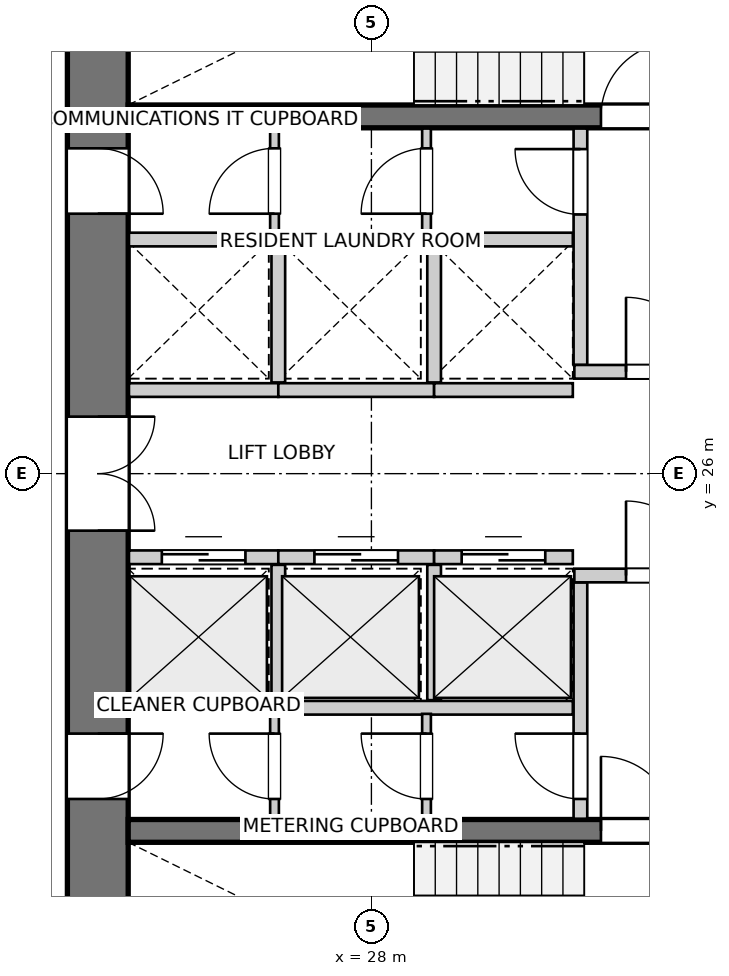
"""IFC4 building model, lengths in metres.
Left out: names, types, materials, properties, quantities, classifications, styles, units other than length and angle.
Written with IfcOpenShell. Run it as: python <this file> out.ifc"""

import sys

from ifc_helpers import new_model, si_unit, direction, frame, frame_2d, origin, place, context, subcontext, project, spatial, rectangle, extrude, source, transform, mapped, element, fill, save


model = new_model("IFC4")
c1 = context("Model", 3, precision=1e-05, world=origin(), true_north=direction((0.0, 1.0)))
c2 = subcontext(c1, "Body", "Model", "MODEL_VIEW")
j1 = project(units=[si_unit("LENGTHUNIT", "METRE"), si_unit("PLANEANGLEUNIT", "RADIAN")], contexts=[c1])
p1 = place(None, origin())
s1 = spatial("IfcSite", under=j1, at=p1, CompositionType="ELEMENT")
p2 = place(p1, origin())
s2 = spatial("IfcBuilding", under=s1, at=p2, CompositionType="ELEMENT")
p3 = place(p2, frame((0.0, 0.0, 30.2)))
s3 = spatial("IfcBuildingStorey", under=s2, at=p3, CompositionType="ELEMENT", Elevation=30.2)
p4 = place(p3, frame((24.4, 33.8, 0.0), z_axis=(0.0, 0.0, 1.0), x_axis=(0.0, -1.0, 0.0)))
e1 = element("IfcWall", 1, at=p4, inside=s3, PredefinedType="SHEAR", context=c2, shape_type="SweptSolid", body=[
    extrude(rectangle(XDim=15.6, YDim=0.8, at=frame_2d((7.8, 0.0))), origin(), (0.0, 0.0, 1.0), 2.935),
])
p5 = place(p4, frame((7.05, 0.0, 0.0)))
e2 = element("IfcOpeningElement", 2, at=p5, cuts=e1, PredefinedType="OPENING", context=c2, shape_type="SweptSolid", body=[
    extrude(rectangle(XDim=1.5, YDim=2.15, at=frame_2d((0.75, 1.075))), frame((0.0, 0.41, 0.0), z_axis=(0.0, -1.0, 0.0), x_axis=(1.0, 0.0, 0.0)), (0.0, 0.0, 1.0), 0.82),
])
p6 = place(p4, frame((3.52, 0.0, 0.0)))
e3 = element("IfcOpeningElement", 3, at=p6, cuts=e1, PredefinedType="OPENING", context=c2, shape_type="SweptSolid", body=[
    extrude(rectangle(XDim=0.86, YDim=2.05, at=frame_2d((0.43, 1.025))), frame((0.0, 0.41, 0.0), z_axis=(0.0, -1.0, 0.0), x_axis=(1.0, 0.0, 0.0)), (0.0, 0.0, 1.0), 0.82),
])
p7 = place(p4, frame((11.22, 0.0, 0.0)))
e4 = element("IfcOpeningElement", 4, at=p7, cuts=e1, PredefinedType="OPENING", context=c2, shape_type="SweptSolid", body=[
    extrude(rectangle(XDim=0.86, YDim=2.05, at=frame_2d((0.43, 1.025))), frame((0.0, 0.41, 0.0), z_axis=(0.0, -1.0, 0.0), x_axis=(1.0, 0.0, 0.0)), (0.0, 0.0, 1.0), 0.82),
])
p8 = place(p3, frame((24.8, 21.3, 0.0), z_axis=(0.0, 0.0, 1.0), x_axis=(1.0, 0.0, 0.0)))
e5 = element("IfcWall", 5, at=p8, inside=s3, PredefinedType="SHEAR", context=c2, shape_type="SweptSolid", body=[
    extrude(rectangle(XDim=11.1, YDim=0.3, at=frame_2d((5.55, 0.0))), origin(), (0.0, 0.0, 1.0), 2.935),
])
p9 = place(p8, frame((6.22, 0.0, 0.0)))
e6 = element("IfcOpeningElement", 6, at=p9, cuts=e5, PredefinedType="OPENING", context=c2, shape_type="SweptSolid", body=[
    extrude(rectangle(XDim=0.98, YDim=2.15, at=frame_2d((0.49, 1.075))), frame((0.0, 0.16, 0.0), z_axis=(0.0, -1.0, 0.0), x_axis=(1.0, 0.0, 0.0)), (0.0, 0.0, 1.0), 0.32),
])
p10 = place(p8, frame((9.15, 0.0, 0.0)))
e7 = element("IfcOpeningElement", 7, at=p10, cuts=e5, PredefinedType="OPENING", context=c2, shape_type="SweptSolid", body=[
    extrude(rectangle(XDim=1.15, YDim=2.15, at=frame_2d((0.575, 1.075))), frame((0.0, 0.16, 0.0), z_axis=(0.0, -1.0, 0.0), x_axis=(1.0, 0.0, 0.0)), (0.0, 0.0, 1.0), 0.32),
])
p11 = place(p3, frame((24.8, 30.7, 0.0), z_axis=(0.0, 0.0, 1.0), x_axis=(1.0, 0.0, 0.0)))
e8 = element("IfcWall", 8, at=p11, inside=s3, PredefinedType="SHEAR", context=c2, shape_type="SweptSolid", body=[
    extrude(rectangle(XDim=11.1, YDim=0.3, at=frame_2d((5.55, 0.0))), origin(), (0.0, 0.0, 1.0), 2.935),
])
p12 = place(p11, frame((6.22, 0.0, 0.0)))
e9 = element("IfcOpeningElement", 9, at=p12, cuts=e8, PredefinedType="OPENING", context=c2, shape_type="SweptSolid", body=[
    extrude(rectangle(XDim=0.98, YDim=2.15, at=frame_2d((0.49, 1.075))), frame((0.0, 0.16, 0.0), z_axis=(0.0, -1.0, 0.0), x_axis=(1.0, 0.0, 0.0)), (0.0, 0.0, 1.0), 0.32),
])
p13 = place(p11, frame((9.15, 0.0, 0.0)))
e10 = element("IfcOpeningElement", 10, at=p13, cuts=e8, PredefinedType="OPENING", context=c2, shape_type="SweptSolid", body=[
    extrude(rectangle(XDim=1.15, YDim=2.15, at=frame_2d((0.575, 1.075))), frame((0.0, 0.16, 0.0), z_axis=(0.0, -1.0, 0.0), x_axis=(1.0, 0.0, 0.0)), (0.0, 0.0, 1.0), 0.32),
])
p14 = place(p3, frame((30.75, 21.46, 0.0), z_axis=(0.0, 0.0, 1.0), x_axis=(0.0, 1.0, 0.0)))
e11 = element("IfcWall", 11, at=p14, inside=s3, PredefinedType="PARTITIONING", context=c2, shape_type="SweptSolid", body=[
    extrude(rectangle(XDim=3.11, YDim=0.18, at=frame_2d((1.555, 0.0))), origin(), (0.0, 0.0, 1.0), 2.935),
])
p15 = place(p14, frame((0.26, 0.0, 0.0)))
e12 = element("IfcOpeningElement", 12, at=p15, cuts=e11, PredefinedType="OPENING", context=c2, shape_type="SweptSolid", body=[
    extrude(rectangle(XDim=0.86, YDim=2.05, at=frame_2d((0.43, 1.025))), frame((0.0, 0.1, 0.0), z_axis=(0.0, -1.0, 0.0), x_axis=(1.0, 0.0, 0.0)), (0.0, 0.0, 1.0), 0.2),
])
p16 = place(p3, frame((30.67, 24.66, 0.0), z_axis=(0.0, 0.0, 1.0), x_axis=(1.0, 0.0, 0.0)))
e13 = element("IfcWall", 13, at=p16, inside=s3, PredefinedType="PARTITIONING", context=c2, shape_type="SweptSolid", body=[
    extrude(rectangle(XDim=5.22, YDim=0.18, at=frame_2d((2.61, 0.0))), origin(), (0.0, 0.0, 1.0), 2.935),
])
p17 = place(p16, frame((0.68, 0.0, 0.0)))
e14 = element("IfcOpeningElement", 14, at=p17, cuts=e13, PredefinedType="OPENING", context=c2, shape_type="SweptSolid", body=[
    extrude(rectangle(XDim=0.98, YDim=2.15, at=frame_2d((0.49, 1.075))), frame((0.0, 0.1, 0.0), z_axis=(0.0, -1.0, 0.0), x_axis=(1.0, 0.0, 0.0)), (0.0, 0.0, 1.0), 0.2),
])
p18 = place(p3, frame((30.75, 27.43, 0.0), z_axis=(0.0, 0.0, 1.0), x_axis=(0.0, 1.0, 0.0)))
e15 = element("IfcWall", 15, at=p18, inside=s3, PredefinedType="PARTITIONING", context=c2, shape_type="SweptSolid", body=[
    extrude(rectangle(XDim=3.11, YDim=0.18, at=frame_2d((1.555, 0.0))), origin(), (0.0, 0.0, 1.0), 2.935),
])
p19 = place(p18, frame((1.98, 0.0, 0.0)))
e16 = element("IfcOpeningElement", 16, at=p19, cuts=e15, PredefinedType="OPENING", context=c2, shape_type="SweptSolid", body=[
    extrude(rectangle(XDim=0.86, YDim=2.05, at=frame_2d((0.43, 1.025))), frame((0.0, 0.1, 0.0), z_axis=(0.0, -1.0, 0.0), x_axis=(1.0, 0.0, 0.0)), (0.0, 0.0, 1.0), 0.2),
])
p20 = place(p3, frame((30.67, 27.34, 0.0), z_axis=(0.0, 0.0, 1.0), x_axis=(1.0, 0.0, 0.0)))
e17 = element("IfcWall", 17, at=p20, inside=s3, PredefinedType="PARTITIONING", context=c2, shape_type="SweptSolid", body=[
    extrude(rectangle(XDim=5.22, YDim=0.18, at=frame_2d((2.61, 0.0))), origin(), (0.0, 0.0, 1.0), 2.935),
])
p21 = place(p20, frame((0.68, 0.0, 0.0)))
e18 = element("IfcOpeningElement", 18, at=p21, cuts=e17, PredefinedType="OPENING", context=c2, shape_type="SweptSolid", body=[
    extrude(rectangle(XDim=0.98, YDim=2.15, at=frame_2d((0.49, 1.075))), frame((0.0, 0.1, 0.0), z_axis=(0.0, -1.0, 0.0), x_axis=(1.0, 0.0, 0.0)), (0.0, 0.0, 1.0), 0.2),
])
p22 = place(p3, frame((24.81, 22.92, 0.0), z_axis=(0.0, 0.0, 1.0), x_axis=(1.0, 0.0, 0.0)))
e19 = element("IfcWall", 19, at=p22, inside=s3, PredefinedType="PARTITIONING", context=c2, shape_type="SweptSolid", body=[
    extrude(rectangle(XDim=5.84, YDim=0.18, at=frame_2d((2.92, 0.0))), origin(), (0.0, 0.0, 1.0), 2.935),
])
p23 = place(p3, frame((24.81, 24.9, 0.0), z_axis=(0.0, 0.0, 1.0), x_axis=(1.0, 0.0, 0.0)))
e20 = element("IfcWall", 20, at=p23, inside=s3, PredefinedType="PARTITIONING", context=c2, shape_type="SweptSolid", body=[
    extrude(rectangle(XDim=1.965, YDim=0.18, at=frame_2d((0.982, 0.0))), origin(), (0.0, 0.0, 1.0), 2.935),
])
p24 = place(p23, frame((0.433, 0.0, 0.0)))
e21 = element("IfcOpeningElement", 21, at=p24, cuts=e20, PredefinedType="OPENING", context=c2, shape_type="SweptSolid", body=[
    extrude(rectangle(XDim=1.1, YDim=2.15, at=frame_2d((0.55, 1.075))), frame((0.0, 0.1, 0.0), z_axis=(0.0, -1.0, 0.0), x_axis=(1.0, 0.0, 0.0)), (0.0, 0.0, 1.0), 0.2),
])
p25 = place(p3, frame((26.775, 24.9, 0.0), z_axis=(0.0, 0.0, 1.0), x_axis=(1.0, 0.0, 0.0)))
e22 = element("IfcWall", 22, at=p25, inside=s3, PredefinedType="PARTITIONING", context=c2, shape_type="SweptSolid", body=[
    extrude(rectangle(XDim=2.05, YDim=0.18, at=frame_2d((1.025, 0.0))), origin(), (0.0, 0.0, 1.0), 2.935),
])
p26 = place(p25, frame((0.475, 0.0, 0.0)))
e23 = element("IfcOpeningElement", 23, at=p26, cuts=e22, PredefinedType="OPENING", context=c2, shape_type="SweptSolid", body=[
    extrude(rectangle(XDim=1.1, YDim=2.15, at=frame_2d((0.55, 1.075))), frame((0.0, 0.1, 0.0), z_axis=(0.0, -1.0, 0.0), x_axis=(1.0, 0.0, 0.0)), (0.0, 0.0, 1.0), 0.2),
])
p27 = place(p3, frame((26.775, 23.02, 0.0), z_axis=(0.0, 0.0, 1.0), x_axis=(0.0, 1.0, 0.0)))
e24 = element("IfcWall", 24, at=p27, inside=s3, PredefinedType="PARTITIONING", context=c2, shape_type="SweptSolid", body=[
    extrude(rectangle(XDim=1.78, YDim=0.18, at=frame_2d((0.89, 0.0))), origin(), (0.0, 0.0, 1.0), 2.935),
])
p28 = place(p3, frame((28.825, 24.9, 0.0), z_axis=(0.0, 0.0, 1.0), x_axis=(1.0, 0.0, 0.0)))
e25 = element("IfcWall", 25, at=p28, inside=s3, PredefinedType="PARTITIONING", context=c2, shape_type="SweptSolid", body=[
    extrude(rectangle(XDim=1.825, YDim=0.18, at=frame_2d((0.913, 0.0))), origin(), (0.0, 0.0, 1.0), 2.935),
])
p29 = place(p28, frame((0.363, 0.0, 0.0)))
e26 = element("IfcOpeningElement", 26, at=p29, cuts=e25, PredefinedType="OPENING", context=c2, shape_type="SweptSolid", body=[
    extrude(rectangle(XDim=1.1, YDim=2.15, at=frame_2d((0.55, 1.075))), frame((0.0, 0.1, 0.0), z_axis=(0.0, -1.0, 0.0), x_axis=(1.0, 0.0, 0.0)), (0.0, 0.0, 1.0), 0.2),
])
p30 = place(p3, frame((28.825, 23.02, 0.0), z_axis=(0.0, 0.0, 1.0), x_axis=(0.0, 1.0, 0.0)))
e27 = element("IfcWall", 27, at=p30, inside=s3, PredefinedType="PARTITIONING", context=c2, shape_type="SweptSolid", body=[
    extrude(rectangle(XDim=1.78, YDim=0.18, at=frame_2d((0.89, 0.0))), origin(), (0.0, 0.0, 1.0), 2.935),
])
p31 = place(p3, frame((24.81, 29.08, 0.0), z_axis=(0.0, 0.0, 1.0), x_axis=(1.0, 0.0, 0.0)))
e28 = element("IfcWall", 28, at=p31, inside=s3, PredefinedType="PARTITIONING", context=c2, shape_type="SweptSolid", body=[
    extrude(rectangle(XDim=5.84, YDim=0.18, at=frame_2d((2.92, 0.0))), origin(), (0.0, 0.0, 1.0), 2.935),
])
p32 = place(p3, frame((24.81, 27.1, 0.0), z_axis=(0.0, 0.0, 1.0), x_axis=(1.0, 0.0, 0.0)))
e29 = element("IfcWall", 29, at=p32, inside=s3, PredefinedType="PARTITIONING", context=c2, shape_type="SweptSolid", body=[
    extrude(rectangle(XDim=1.965, YDim=0.18, at=frame_2d((0.982, 0.0))), origin(), (0.0, 0.0, 1.0), 2.935),
])
p33 = place(p3, frame((26.775, 27.1, 0.0), z_axis=(0.0, 0.0, 1.0), x_axis=(1.0, 0.0, 0.0)))
e30 = element("IfcWall", 30, at=p33, inside=s3, PredefinedType="PARTITIONING", context=c2, shape_type="SweptSolid", body=[
    extrude(rectangle(XDim=2.05, YDim=0.18, at=frame_2d((1.025, 0.0))), origin(), (0.0, 0.0, 1.0), 2.935),
])
p34 = place(p3, frame((26.775, 27.2, 0.0), z_axis=(0.0, 0.0, 1.0), x_axis=(0.0, 1.0, 0.0)))
e31 = element("IfcWall", 31, at=p34, inside=s3, PredefinedType="PARTITIONING", context=c2, shape_type="SweptSolid", body=[
    extrude(rectangle(XDim=1.78, YDim=0.18, at=frame_2d((0.89, 0.0))), origin(), (0.0, 0.0, 1.0), 2.935),
])
p35 = place(p3, frame((28.825, 27.1, 0.0), z_axis=(0.0, 0.0, 1.0), x_axis=(1.0, 0.0, 0.0)))
e32 = element("IfcWall", 32, at=p35, inside=s3, PredefinedType="PARTITIONING", context=c2, shape_type="SweptSolid", body=[
    extrude(rectangle(XDim=1.825, YDim=0.18, at=frame_2d((0.913, 0.0))), origin(), (0.0, 0.0, 1.0), 2.935),
])
p36 = place(p3, frame((28.825, 27.2, 0.0), z_axis=(0.0, 0.0, 1.0), x_axis=(0.0, 1.0, 0.0)))
e33 = element("IfcWall", 33, at=p36, inside=s3, PredefinedType="PARTITIONING", context=c2, shape_type="SweptSolid", body=[
    extrude(rectangle(XDim=1.78, YDim=0.18, at=frame_2d((0.89, 0.0))), origin(), (0.0, 0.0, 1.0), 2.935),
])
p37 = place(p3, frame((26.725, 21.46, 0.0), z_axis=(0.0, 0.0, 1.0), x_axis=(0.0, 1.0, 0.0)))
e34 = element("IfcWall", 34, at=p37, inside=s3, PredefinedType="PARTITIONING", context=c2, shape_type="SweptSolid", body=[
    extrude(rectangle(XDim=1.38, YDim=0.115, at=frame_2d((0.69, 0.0))), origin(), (0.0, 0.0, 1.0), 2.935),
])
p38 = place(p37, frame((0.26, 0.0, 0.0)))
e35 = element("IfcOpeningElement", 35, at=p38, cuts=e34, PredefinedType="OPENING", context=c2, shape_type="SweptSolid", body=[
    extrude(rectangle(XDim=0.86, YDim=2.05, at=frame_2d((0.43, 1.025))), frame((0.0, 0.067, 0.0), z_axis=(0.0, -1.0, 0.0), x_axis=(1.0, 0.0, 0.0)), (0.0, 0.0, 1.0), 0.135),
])
p39 = place(p3, frame((26.725, 29.16, 0.0), z_axis=(0.0, 0.0, 1.0), x_axis=(0.0, 1.0, 0.0)))
e36 = element("IfcWall", 36, at=p39, inside=s3, PredefinedType="PARTITIONING", context=c2, shape_type="SweptSolid", body=[
    extrude(rectangle(XDim=1.38, YDim=0.115, at=frame_2d((0.69, 0.0))), origin(), (0.0, 0.0, 1.0), 2.935),
])
p40 = place(p39, frame((0.26, 0.0, 0.0)))
e37 = element("IfcOpeningElement", 37, at=p40, cuts=e36, PredefinedType="OPENING", context=c2, shape_type="SweptSolid", body=[
    extrude(rectangle(XDim=0.86, YDim=2.05, at=frame_2d((0.43, 1.025))), frame((0.0, 0.067, 0.0), z_axis=(0.0, -1.0, 0.0), x_axis=(1.0, 0.0, 0.0)), (0.0, 0.0, 1.0), 0.135),
])
p41 = place(p3, frame((28.725, 21.46, 0.0), z_axis=(0.0, 0.0, 1.0), x_axis=(0.0, 1.0, 0.0)))
e38 = element("IfcWall", 38, at=p41, inside=s3, PredefinedType="PARTITIONING", context=c2, shape_type="SweptSolid", body=[
    extrude(rectangle(XDim=1.38, YDim=0.115, at=frame_2d((0.69, 0.0))), origin(), (0.0, 0.0, 1.0), 2.935),
])
p42 = place(p41, frame((0.26, 0.0, 0.0)))
e39 = element("IfcOpeningElement", 39, at=p42, cuts=e38, PredefinedType="OPENING", context=c2, shape_type="SweptSolid", body=[
    extrude(rectangle(XDim=0.86, YDim=2.05, at=frame_2d((0.43, 1.025))), frame((0.0, 0.067, 0.0), z_axis=(0.0, -1.0, 0.0), x_axis=(1.0, 0.0, 0.0)), (0.0, 0.0, 1.0), 0.135),
])
p43 = place(p3, frame((28.725, 29.16, 0.0), z_axis=(0.0, 0.0, 1.0), x_axis=(0.0, 1.0, 0.0)))
e40 = element("IfcWall", 40, at=p43, inside=s3, PredefinedType="PARTITIONING", context=c2, shape_type="SweptSolid", body=[
    extrude(rectangle(XDim=1.38, YDim=0.115, at=frame_2d((0.69, 0.0))), origin(), (0.0, 0.0, 1.0), 2.935),
])
p44 = place(p43, frame((0.26, 0.0, 0.0)))
e41 = element("IfcOpeningElement", 41, at=p44, cuts=e40, PredefinedType="OPENING", context=c2, shape_type="SweptSolid", body=[
    extrude(rectangle(XDim=0.86, YDim=2.05, at=frame_2d((0.43, 1.025))), frame((0.0, 0.067, 0.0), z_axis=(0.0, -1.0, 0.0), x_axis=(1.0, 0.0, 0.0)), (0.0, 0.0, 1.0), 0.135),
])
m1 = source(origin(), c2, "Body", "SweptSolid", [
    extrude(rectangle(XDim=0.98, YDim=2.15, at=frame_2d((0.49, 1.075))), frame((0.0, 0.025, 0.0), z_axis=(0.0, -1.0, 0.0), x_axis=(1.0, 0.0, 0.0)), (0.0, 0.0, 1.0), 0.05),
])
p45 = place(p9, origin())
e42 = element("IfcDoor", 42, at=p45, inside=s3, OperationType="SINGLE_SWING_LEFT", PredefinedType="DOOR", context=c2, shape_type="MappedRepresentation", body=[
    mapped(m1, transform((0.0, 0.0, 0.0), x_axis=(1.0, 0.0, 0.0), y_axis=(0.0, 1.0, 0.0), z_axis=(0.0, 0.0, 1.0), scale=1.0)),
])
fill(e6, e42)
p46 = place(p12, origin())
e43 = element("IfcDoor", 43, at=p46, inside=s3, OperationType="SINGLE_SWING_RIGHT", PredefinedType="DOOR", context=c2, shape_type="MappedRepresentation", body=[
    mapped(m1, transform((0.0, 0.0, 0.0), x_axis=(1.0, 0.0, 0.0), y_axis=(0.0, 1.0, 0.0), z_axis=(0.0, 0.0, 1.0), scale=1.0)),
])
fill(e9, e43)
m2 = source(origin(), c2, "Body", "SweptSolid", [
    extrude(rectangle(XDim=1.5, YDim=2.15, at=frame_2d((0.75, 1.075))), frame((0.0, 0.025, 0.0), z_axis=(0.0, -1.0, 0.0), x_axis=(1.0, 0.0, 0.0)), (0.0, 0.0, 1.0), 0.05),
])
p47 = place(p5, origin())
e44 = element("IfcDoor", 44, at=p47, inside=s3, OperationType="DOUBLE_DOOR_SINGLE_SWING", PredefinedType="DOOR", context=c2, shape_type="MappedRepresentation", body=[
    mapped(m2, transform((0.0, 0.0, 0.0), x_axis=(1.0, 0.0, 0.0), y_axis=(0.0, 1.0, 0.0), z_axis=(0.0, 0.0, 1.0), scale=1.0)),
])
fill(e2, e44)
m3 = source(origin(), c2, "Body", "SweptSolid", [
    extrude(rectangle(XDim=0.86, YDim=2.05, at=frame_2d((0.43, 1.025))), frame((0.0, 0.025, 0.0), z_axis=(0.0, -1.0, 0.0), x_axis=(1.0, 0.0, 0.0)), (0.0, 0.0, 1.0), 0.05),
])
p48 = place(p6, origin())
e45 = element("IfcDoor", 45, at=p48, inside=s3, OperationType="SINGLE_SWING_RIGHT", PredefinedType="DOOR", context=c2, shape_type="MappedRepresentation", body=[
    mapped(m3, transform((0.0, 0.0, 0.0), x_axis=(1.0, 0.0, 0.0), y_axis=(0.0, 1.0, 0.0), z_axis=(0.0, 0.0, 1.0), scale=1.0)),
])
fill(e3, e45)
p49 = place(p7, origin())
e46 = element("IfcDoor", 46, at=p49, inside=s3, OperationType="SINGLE_SWING_LEFT", PredefinedType="DOOR", context=c2, shape_type="MappedRepresentation", body=[
    mapped(m3, transform((0.0, 0.0, 0.0), x_axis=(1.0, 0.0, 0.0), y_axis=(0.0, 1.0, 0.0), z_axis=(0.0, 0.0, 1.0), scale=1.0)),
])
fill(e4, e46)
p50 = place(p15, origin())
e47 = element("IfcDoor", 47, at=p50, inside=s3, OperationType="SINGLE_SWING_RIGHT", PredefinedType="DOOR", context=c2, shape_type="MappedRepresentation", body=[
    mapped(m3, transform((0.0, 0.0, 0.0), x_axis=(1.0, 0.0, 0.0), y_axis=(0.0, 1.0, 0.0), z_axis=(0.0, 0.0, 1.0), scale=1.0)),
])
fill(e12, e47)
p51 = place(p17, origin())
e48 = element("IfcDoor", 48, at=p51, inside=s3, OperationType="SINGLE_SWING_LEFT", PredefinedType="DOOR", context=c2, shape_type="MappedRepresentation", body=[
    mapped(m1, transform((0.0, 0.0, 0.0), x_axis=(1.0, 0.0, 0.0), y_axis=(0.0, 1.0, 0.0), z_axis=(0.0, 0.0, 1.0), scale=1.0)),
])
fill(e14, e48)
p52 = place(p19, origin())
e49 = element("IfcDoor", 49, at=p52, inside=s3, OperationType="SINGLE_SWING_RIGHT", PredefinedType="DOOR", context=c2, shape_type="MappedRepresentation", body=[
    mapped(m3, transform((0.0, 0.0, 0.0), x_axis=(1.0, 0.0, 0.0), y_axis=(0.0, 1.0, 0.0), z_axis=(0.0, 0.0, 1.0), scale=1.0)),
])
fill(e16, e49)
p53 = place(p21, origin())
e50 = element("IfcDoor", 50, at=p53, inside=s3, OperationType="SINGLE_SWING_LEFT", PredefinedType="DOOR", context=c2, shape_type="MappedRepresentation", body=[
    mapped(m1, transform((0.0, 0.0, 0.0), x_axis=(1.0, 0.0, 0.0), y_axis=(0.0, 1.0, 0.0), z_axis=(0.0, 0.0, 1.0), scale=1.0)),
])
fill(e18, e50)
m4 = source(origin(), c2, "Body", "SweptSolid", [
    extrude(rectangle(XDim=1.1, YDim=2.15, at=frame_2d((0.55, 1.075))), frame((0.0, 0.025, 0.0), z_axis=(0.0, -1.0, 0.0), x_axis=(1.0, 0.0, 0.0)), (0.0, 0.0, 1.0), 0.05),
])
p54 = place(p24, origin())
e51 = element("IfcDoor", 51, at=p54, inside=s3, OperationType="DOUBLE_DOOR_SLIDING", PredefinedType="DOOR", context=c2, shape_type="MappedRepresentation", body=[
    mapped(m4, transform((0.0, 0.0, 0.0), x_axis=(1.0, 0.0, 0.0), y_axis=(0.0, 1.0, 0.0), z_axis=(0.0, 0.0, 1.0), scale=1.0)),
])
fill(e21, e51)
p55 = place(p26, origin())
e52 = element("IfcDoor", 52, at=p55, inside=s3, OperationType="DOUBLE_DOOR_SLIDING", PredefinedType="DOOR", context=c2, shape_type="MappedRepresentation", body=[
    mapped(m4, transform((0.0, 0.0, 0.0), x_axis=(1.0, 0.0, 0.0), y_axis=(0.0, 1.0, 0.0), z_axis=(0.0, 0.0, 1.0), scale=1.0)),
])
fill(e23, e52)
p56 = place(p29, origin())
e53 = element("IfcDoor", 53, at=p56, inside=s3, OperationType="DOUBLE_DOOR_SLIDING", PredefinedType="DOOR", context=c2, shape_type="MappedRepresentation", body=[
    mapped(m4, transform((0.0, 0.0, 0.0), x_axis=(1.0, 0.0, 0.0), y_axis=(0.0, 1.0, 0.0), z_axis=(0.0, 0.0, 1.0), scale=1.0)),
])
fill(e26, e53)
p57 = place(p38, origin())
e54 = element("IfcDoor", 54, at=p57, inside=s3, OperationType="SINGLE_SWING_RIGHT", PredefinedType="DOOR", context=c2, shape_type="MappedRepresentation", body=[
    mapped(m3, transform((0.0, 0.0, 0.0), x_axis=(1.0, 0.0, 0.0), y_axis=(0.0, 1.0, 0.0), z_axis=(0.0, 0.0, 1.0), scale=1.0)),
])
fill(e35, e54)
p58 = place(p40, origin())
e55 = element("IfcDoor", 55, at=p58, inside=s3, OperationType="SINGLE_SWING_LEFT", PredefinedType="DOOR", context=c2, shape_type="MappedRepresentation", body=[
    mapped(m3, transform((0.0, 0.0, 0.0), x_axis=(1.0, 0.0, 0.0), y_axis=(0.0, 1.0, 0.0), z_axis=(0.0, 0.0, 1.0), scale=1.0)),
])
fill(e37, e55)
p59 = place(p42, origin())
e56 = element("IfcDoor", 56, at=p59, inside=s3, OperationType="SINGLE_SWING_RIGHT", PredefinedType="DOOR", context=c2, shape_type="MappedRepresentation", body=[
    mapped(m3, transform((0.0, 0.0, 0.0), x_axis=(1.0, 0.0, 0.0), y_axis=(0.0, 1.0, 0.0), z_axis=(0.0, 0.0, 1.0), scale=1.0)),
])
fill(e39, e56)
p60 = place(p44, origin())
e57 = element("IfcDoor", 57, at=p60, inside=s3, OperationType="SINGLE_SWING_LEFT", PredefinedType="DOOR", context=c2, shape_type="MappedRepresentation", body=[
    mapped(m3, transform((0.0, 0.0, 0.0), x_axis=(1.0, 0.0, 0.0), y_axis=(0.0, 1.0, 0.0), z_axis=(0.0, 0.0, 1.0), scale=1.0)),
])
fill(e41, e57)
save(model, sys.argv[1])
